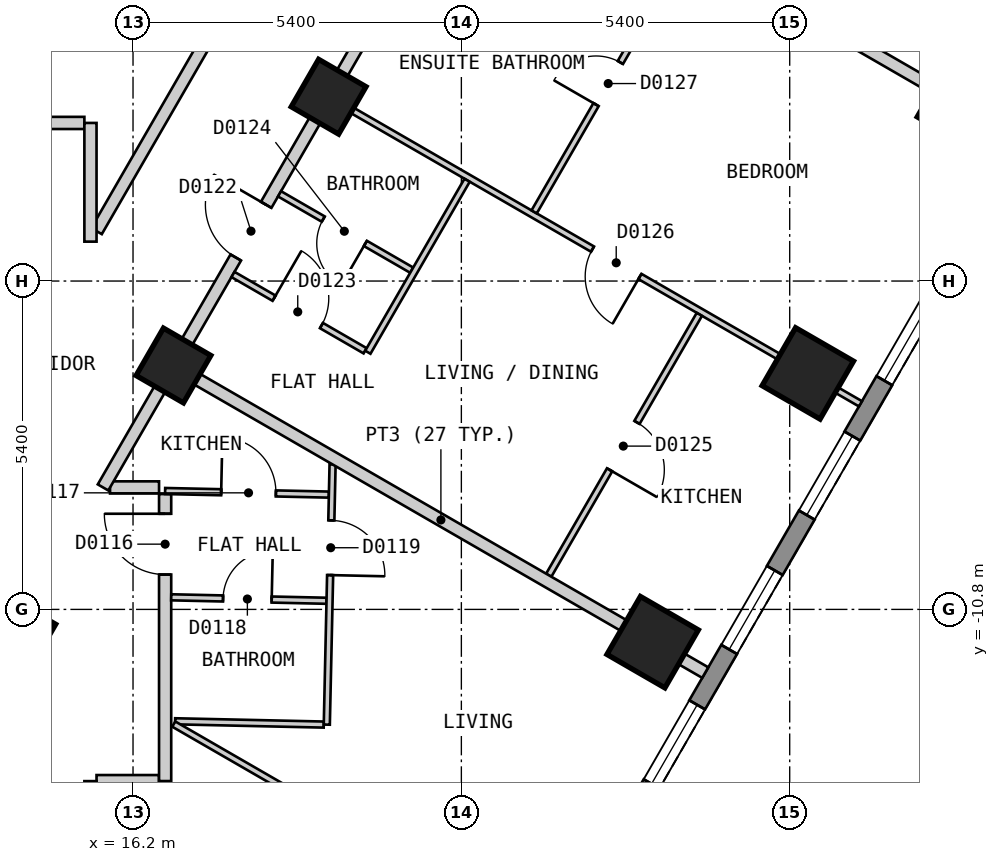
"""IFC4 building model, lengths in metres.
Left out: names, types, materials, properties, quantities, classifications, styles, units other than length and angle.
Written with IfcOpenShell. Run it as: python <this file> out.ifc"""

import sys

from ifc_helpers import new_model, si_unit, direction, frame, frame_2d, origin, origin_2d, place, context, subcontext, project, spatial, polyline, rectangle, outline, extrude, element, fill, save


model = new_model("IFC4")
c1 = context("Model", 3, precision=1e-05, world=origin(), true_north=direction((0.0, 1.0)))
c2 = subcontext(c1, "Body", "Model", "MODEL_VIEW")
j1 = project(units=[si_unit("LENGTHUNIT", "METRE"), si_unit("PLANEANGLEUNIT", "RADIAN")], contexts=[c1])
p1 = place(None, origin())
s1 = spatial("IfcSite", under=j1, at=p1, CompositionType="ELEMENT")
p2 = place(p1, origin())
s2 = spatial("IfcBuilding", under=s1, at=p2, CompositionType="ELEMENT")
p3 = place(p2, frame((0.0, 0.0, 23.4)))
s3 = spatial("IfcBuildingStorey", under=s2, at=p3, CompositionType="ELEMENT", Elevation=23.4)
for number, where, z_axis, x_axis in (
    (1, (24.746, -11.339, 0.0), (0.0, 0.0, 1.0), (0.5, 0.866, 0.0)),
    (2, (27.298, -6.919, 0.0), (0.0, 0.0, 1.0), (0.5, 0.866, 0.0)),
    (3, (29.849, -2.499, 0.0), (0.0, 0.0, 1.0), (0.5, 0.866, 0.0)),
):
    element("IfcColumn", number, at=place(p3, frame(where, z_axis=z_axis, x_axis=x_axis)), inside=s3, PredefinedType="COLUMN", context=c2, shape_type="SweptSolid", body=[
        extrude(rectangle(XDim=1.1, YDim=1.1, at=origin_2d()), origin(), (0.0, 0.0, 1.0), 3.0),
    ])
for number, where, z_axis, x_axis in (
    (4, (14.313, -11.209, 0.0), (0.0, 0.0, 1.0), (0.5, 0.866, 0.0)),
    (5, (16.865, -6.789, 0.0), (0.0, 0.0, 1.0), (0.5, 0.866, 0.0)),
    (6, (19.417, -2.369, 0.0), (0.0, 0.0, 1.0), (0.5, 0.866, 0.0)),
):
    element("IfcColumn", number, at=place(p3, frame(where, z_axis=z_axis, x_axis=x_axis)), inside=s3, PredefinedType="COLUMN", context=c2, shape_type="SweptSolid", body=[
        extrude(rectangle(XDim=0.9, YDim=0.9, at=origin_2d()), origin(), (0.0, 0.0, 1.0), 3.0),
    ])
p4 = place(p3, frame((17.71, -25.825, 0.0), z_axis=(0.0, 0.0, 1.0), x_axis=(0.500001938803, 0.866024284413, 0.0)))
e7 = element("IfcWall", 7, at=p4, inside=s3, PredefinedType="SOLIDWALL", context=c2, shape_type="SweptSolid", body=[
    extrude(outline(polyline([(0.0, -0.15), (27.02, -0.15), (26.94, 0.15), (0.08, 0.15), (0.0, -0.15)])), origin(), (0.0, 0.0, 1.0), 2.7),
])
p5 = place(p4, frame((1.277, 0.0, 0.15)))
e8 = element("IfcOpeningElement", 8, at=p5, cuts=e7, PredefinedType="OPENING", context=c2, shape_type="SweptSolid", body=[
    extrude(rectangle(XDim=1.5, YDim=2.1, at=frame_2d((0.75, 1.05))), frame((0.0, 0.16, 0.0), z_axis=(0.0, -1.0, 0.0), x_axis=(1.0, 0.0, 0.0)), (0.0, 0.0, 1.0), 0.32),
])
p6 = place(p4, frame((3.829, 0.0, 0.15)))
e9 = element("IfcOpeningElement", 9, at=p6, cuts=e7, PredefinedType="OPENING", context=c2, shape_type="SweptSolid", body=[
    extrude(rectangle(XDim=1.5, YDim=2.1, at=frame_2d((0.75, 1.05))), frame((0.0, 0.16, 0.0), z_axis=(0.0, -1.0, 0.0), x_axis=(1.0, 0.0, 0.0)), (0.0, 0.0, 1.0), 0.32),
])
p7 = place(p4, frame((6.382, 0.0, 0.15)))
e10 = element("IfcOpeningElement", 10, at=p7, cuts=e7, PredefinedType="OPENING", context=c2, shape_type="SweptSolid", body=[
    extrude(rectangle(XDim=1.5, YDim=2.1, at=frame_2d((0.75, 1.05))), frame((0.0, 0.16, 0.0), z_axis=(0.0, -1.0, 0.0), x_axis=(1.0, 0.0, 0.0)), (0.0, 0.0, 1.0), 0.32),
])
p8 = place(p4, frame((8.933, 0.0, 0.15)))
e11 = element("IfcOpeningElement", 11, at=p8, cuts=e7, PredefinedType="OPENING", context=c2, shape_type="SweptSolid", body=[
    extrude(rectangle(XDim=1.5, YDim=2.1, at=frame_2d((0.75, 1.05))), frame((0.0, 0.16, 0.0), z_axis=(0.0, -1.0, 0.0), x_axis=(1.0, 0.0, 0.0)), (0.0, 0.0, 1.0), 0.32),
])
p9 = place(p4, frame((11.485, 0.0, 0.15)))
e12 = element("IfcOpeningElement", 12, at=p9, cuts=e7, PredefinedType="OPENING", context=c2, shape_type="SweptSolid", body=[
    extrude(rectangle(XDim=1.5, YDim=2.1, at=frame_2d((0.75, 1.05))), frame((0.0, 0.16, 0.0), z_axis=(0.0, -1.0, 0.0), x_axis=(1.0, 0.0, 0.0)), (0.0, 0.0, 1.0), 0.32),
])
p10 = place(p4, frame((14.037, 0.0, 0.15)))
e13 = element("IfcOpeningElement", 13, at=p10, cuts=e7, PredefinedType="OPENING", context=c2, shape_type="SweptSolid", body=[
    extrude(rectangle(XDim=1.5, YDim=2.1, at=frame_2d((0.75, 1.05))), frame((0.0, 0.16, 0.0), z_axis=(0.0, -1.0, 0.0), x_axis=(1.0, 0.0, 0.0)), (0.0, 0.0, 1.0), 0.32),
])
p11 = place(p4, frame((16.589, 0.0, 0.15)))
e14 = element("IfcOpeningElement", 14, at=p11, cuts=e7, PredefinedType="OPENING", context=c2, shape_type="SweptSolid", body=[
    extrude(rectangle(XDim=1.5, YDim=2.1, at=frame_2d((0.75, 1.05))), frame((0.0, 0.16, 0.0), z_axis=(0.0, -1.0, 0.0), x_axis=(1.0, 0.0, 0.0)), (0.0, 0.0, 1.0), 0.32),
])
p12 = place(p4, frame((19.141, 0.0, 0.15)))
e15 = element("IfcOpeningElement", 15, at=p12, cuts=e7, PredefinedType="OPENING", context=c2, shape_type="SweptSolid", body=[
    extrude(rectangle(XDim=1.5, YDim=2.1, at=frame_2d((0.75, 1.05))), frame((0.0, 0.16, 0.0), z_axis=(0.0, -1.0, 0.0), x_axis=(1.0, 0.0, 0.0)), (0.0, 0.0, 1.0), 0.32),
])
p13 = place(p4, frame((21.693, 0.0, 0.15)))
e16 = element("IfcOpeningElement", 16, at=p13, cuts=e7, PredefinedType="OPENING", context=c2, shape_type="SweptSolid", body=[
    extrude(rectangle(XDim=1.5, YDim=2.1, at=frame_2d((0.75, 1.05))), frame((0.0, 0.16, 0.0), z_axis=(0.0, -1.0, 0.0), x_axis=(1.0, 0.0, 0.0)), (0.0, 0.0, 1.0), 0.32),
])
p14 = place(p4, frame((24.244, 0.0, 0.15)))
e17 = element("IfcOpeningElement", 17, at=p14, cuts=e7, PredefinedType="OPENING", context=c2, shape_type="SweptSolid", body=[
    extrude(rectangle(XDim=1.5, YDim=2.1, at=frame_2d((0.75, 1.05))), frame((0.0, 0.16, 0.0), z_axis=(0.0, -1.0, 0.0), x_axis=(1.0, 0.0, 0.0)), (0.0, 0.0, 1.0), 0.32),
])
p15 = place(p3, frame((15.822, -8.794, 0.0), z_axis=(0.0, 0.0, 1.0), x_axis=(1.0, 0.0, 0.0)))
e18 = element("IfcWall", 18, at=p15, inside=s3, PredefinedType="PARTITIONING", context=c2, shape_type="SweptSolid", body=[
    extrude(rectangle(XDim=0.806, YDim=0.2, at=frame_2d((0.403, 0.0))), origin(), (0.0, 0.0, 1.0), 2.7),
])
p16 = place(p3, frame((15.6, -13.624, 0.0), z_axis=(0.0, 0.0, 1.0), x_axis=(1.0, 0.0, 0.0)))
e19 = element("IfcWall", 19, at=p16, inside=s3, PredefinedType="PARTITIONING", context=c2, shape_type="SweptSolid", body=[
    extrude(rectangle(XDim=1.027, YDim=0.2, at=frame_2d((0.513, 0.0))), origin(), (0.0, 0.0, 1.0), 2.7),
])
p17 = place(p3, frame((7.028, -2.8, 0.0), z_axis=(0.0, 0.0, 1.0), x_axis=(1.0, 0.0, 0.0)))
e20 = element("IfcWall", 20, at=p17, inside=s3, PredefinedType="PARTITIONING", context=c2, shape_type="SweptSolid", body=[
    extrude(rectangle(XDim=8.372, YDim=0.2, at=frame_2d((4.186, 0.0))), origin(), (0.0, 0.0, 1.0), 2.7),
])
p18 = place(p3, frame((15.6, -4.579, 0.0), z_axis=(0.0, 0.0, 1.0), x_axis=(0.499927597274, 0.866067201483, 0.0)))
e21 = element("IfcWall", 21, at=p18, inside=s3, PredefinedType="PARTITIONING", context=c2, shape_type="SweptSolid", body=[
    extrude(rectangle(XDim=5.288, YDim=0.2, at=frame_2d((2.644, 0.0))), origin(), (0.0, 0.0, 1.0), 2.7),
])
p19 = place(p3, frame((15.707, -8.794, 0.0), z_axis=(0.0, 0.0, 1.0), x_axis=(0.500040469623, 0.866002037376, 0.0)))
e22 = element("IfcWall", 22, at=p19, inside=s3, PredefinedType="PARTITIONING", context=c2, shape_type="SweptSolid", body=[
    extrude(rectangle(XDim=2.281, YDim=0.2, at=frame_2d((1.141, 0.0))), origin(), (0.0, 0.0, 1.0), 2.7),
])
p20 = place(p3, frame((16.914, -6.703, 0.0), z_axis=(0.0, 0.0, 1.0), x_axis=(0.50003007663, 0.866008038338, 0.0)))
e23 = element("IfcWall", 23, at=p20, inside=s3, PredefinedType="PARTITIONING", context=c2, shape_type="SweptSolid", body=[
    extrude(rectangle(XDim=7.625, YDim=0.2, at=frame_2d((3.813, 0.0))), origin(), (0.0, 0.0, 1.0), 2.7),
])
p21 = place(p20, frame((1.952, 0.0, 0.0)))
e24 = element("IfcOpeningElement", 24, at=p21, cuts=e23, PredefinedType="OPENING", context=c2, shape_type="SweptSolid", body=[
    extrude(rectangle(XDim=1.0, YDim=2.1, at=frame_2d((0.5, 1.05))), frame((0.0, 0.11, 0.0), z_axis=(0.0, -1.0, 0.0), x_axis=(1.0, 0.0, 0.0)), (0.0, 0.0, 1.0), 0.22),
])
p22 = place(p3, frame((15.5, -21.199, 0.0), z_axis=(0.0, 0.0, 1.0), x_axis=(0.0, 1.0, 0.0)))
e25 = element("IfcWall", 25, at=p22, inside=s3, PredefinedType="PARTITIONING", context=c2, shape_type="SweptSolid", body=[
    extrude(rectangle(XDim=7.575, YDim=0.2, at=frame_2d((3.788, 0.0))), origin(), (0.0, 0.0, 1.0), 2.7),
])
p23 = place(p22, frame((1.288, 0.0, 0.0)))
e26 = element("IfcOpeningElement", 26, at=p23, cuts=e25, PredefinedType="OPENING", context=c2, shape_type="SweptSolid", body=[
    extrude(rectangle(XDim=0.8, YDim=2.1, at=frame_2d((0.4, 1.05))), frame((0.0, 0.11, 0.0), z_axis=(0.0, -1.0, 0.0), x_axis=(1.0, 0.0, 0.0)), (0.0, 0.0, 1.0), 0.22),
])
p24 = place(p3, frame((15.5, -4.752, 0.0), z_axis=(0.0, 0.0, 1.0), x_axis=(0.0, 1.0, 0.0)))
e27 = element("IfcWall", 27, at=p24, inside=s3, PredefinedType="PARTITIONING", context=c2, shape_type="SweptSolid", body=[
    extrude(rectangle(XDim=1.952, YDim=0.2, at=frame_2d((0.976, 0.0))), origin(), (0.0, 0.0, 1.0), 2.7),
])
p25 = place(p3, frame((16.728, -13.623, 0.0), z_axis=(0.0, 0.0, 1.0), x_axis=(0.0, 1.0, 0.0)))
e28 = element("IfcWall", 28, at=p25, inside=s3, PredefinedType="PARTITIONING", context=c2, shape_type="SweptSolid", body=[
    extrude(rectangle(XDim=4.72, YDim=0.2, at=frame_2d((2.36, 0.0))), origin(), (0.0, 0.0, 1.0), 2.7),
])
p26 = place(p25, frame((3.396, 0.0, 0.0)))
e29 = element("IfcOpeningElement", 29, at=p26, cuts=e28, PredefinedType="OPENING", context=c2, shape_type="SweptSolid", body=[
    extrude(rectangle(XDim=1.0, YDim=2.1, at=frame_2d((0.5, 1.05))), frame((0.0, 0.11, 0.0), z_axis=(0.0, -1.0, 0.0), x_axis=(1.0, 0.0, 0.0)), (0.0, 0.0, 1.0), 0.22),
])
p27 = place(p3, frame((16.728, -8.853, 0.0), z_axis=(0.0, 0.0, 1.0), x_axis=(0.999759401479, -0.02193488442, 0.0)))
e30 = element("IfcWall", 30, at=p27, inside=s3, PredefinedType="PARTITIONING", context=c2, shape_type="SweptSolid", body=[
    extrude(rectangle(XDim=2.694, YDim=0.1, at=frame_2d((1.347, 0.0))), origin(), (0.0, 0.0, 1.0), 2.7),
])
p28 = place(p27, frame((0.922, 0.0, 0.0)))
e31 = element("IfcOpeningElement", 31, at=p28, cuts=e30, PredefinedType="OPENING", context=c2, shape_type="SweptSolid", body=[
    extrude(rectangle(XDim=0.9, YDim=2.1, at=frame_2d((0.45, 1.05))), frame((0.0, 0.06, 0.0), z_axis=(0.0, -1.0, 0.0), x_axis=(1.0, 0.0, 0.0)), (0.0, 0.0, 1.0), 0.12),
])
p29 = place(p3, frame((16.828, -10.601, 0.0), z_axis=(0.0, 0.0, 1.0), x_axis=(0.999752091799, -0.022265555094, 0.0)))
e32 = element("IfcWall", 32, at=p29, inside=s3, PredefinedType="PARTITIONING", context=c2, shape_type="SweptSolid", body=[
    extrude(rectangle(XDim=2.555, YDim=0.1, at=frame_2d((1.277, 0.0))), origin(), (0.0, 0.0, 1.0), 2.7),
])
p30 = place(p29, frame((0.853, 0.0, 0.0)))
e33 = element("IfcOpeningElement", 33, at=p30, cuts=e32, PredefinedType="OPENING", context=c2, shape_type="SweptSolid", body=[
    extrude(rectangle(XDim=0.8, YDim=2.1, at=frame_2d((0.4, 1.05))), frame((0.0, 0.06, 0.0), z_axis=(0.0, -1.0, 0.0), x_axis=(1.0, 0.0, 0.0)), (0.0, 0.0, 1.0), 0.12),
])
p31 = place(p3, frame((16.892, -12.64, 0.0), z_axis=(0.0, 0.0, 1.0), x_axis=(0.999754359069, -0.022163517846, 0.0)))
e34 = element("IfcWall", 34, at=p31, inside=s3, PredefinedType="PARTITIONING", context=c2, shape_type="SweptSolid", body=[
    extrude(rectangle(XDim=2.445, YDim=0.1, at=frame_2d((1.223, 0.0))), origin(), (0.0, 0.0, 1.0), 2.7),
])
p32 = place(p3, frame((16.87, -12.686, 0.0), z_axis=(0.0, 0.0, 1.0), x_axis=(0.866071826058, -0.499919585642, 0.0)))
e35 = element("IfcWall", 35, at=p32, inside=s3, PredefinedType="PARTITIONING", context=c2, shape_type="SweptSolid", body=[
    extrude(rectangle(XDim=7.147, YDim=0.1, at=frame_2d((3.574, 0.0))), origin(), (0.0, 0.0, 1.0), 2.7),
])
p33 = place(p32, frame((4.558, 0.0, 0.0)))
e36 = element("IfcOpeningElement", 36, at=p33, cuts=e35, PredefinedType="OPENING", context=c2, shape_type="SweptSolid", body=[
    extrude(rectangle(XDim=0.9, YDim=2.1, at=frame_2d((0.45, 1.05))), frame((0.0, 0.06, 0.0), z_axis=(0.0, -1.0, 0.0), x_axis=(1.0, 0.0, 0.0)), (0.0, 0.0, 1.0), 0.12),
])
p34 = place(p3, frame((17.844, -5.292, 0.0), z_axis=(0.0, 0.0, 1.0), x_axis=(0.865940918122, -0.500146304917, 0.0)))
e37 = element("IfcWall", 37, at=p34, inside=s3, PredefinedType="PARTITIONING", context=c2, shape_type="SweptSolid", body=[
    extrude(rectangle(XDim=2.51, YDim=0.1, at=frame_2d((1.255, 0.0))), origin(), (0.0, 0.0, 1.0), 2.7),
])
p35 = place(p34, frame((0.78, 0.0, 0.0)))
e38 = element("IfcOpeningElement", 38, at=p35, cuts=e37, PredefinedType="OPENING", context=c2, shape_type="SweptSolid", body=[
    extrude(rectangle(XDim=0.9, YDim=2.1, at=frame_2d((0.45, 1.05))), frame((0.0, 0.06, 0.0), z_axis=(0.0, -1.0, 0.0), x_axis=(1.0, 0.0, 0.0)), (0.0, 0.0, 1.0), 0.12),
])
p36 = place(p3, frame((18.61, -3.966, 0.0), z_axis=(0.0, 0.0, 1.0), x_axis=(0.865958718457, -0.500115484592, 0.0)))
e39 = element("IfcWall", 39, at=p36, inside=s3, PredefinedType="PARTITIONING", context=c2, shape_type="SweptSolid", body=[
    extrude(rectangle(XDim=2.509, YDim=0.1, at=frame_2d((1.255, 0.0))), origin(), (0.0, 0.0, 1.0), 2.7),
])
p37 = place(p36, frame((0.83, 0.0, 0.0)))
e40 = element("IfcOpeningElement", 40, at=p37, cuts=e39, PredefinedType="OPENING", context=c2, shape_type="SweptSolid", body=[
    extrude(rectangle(XDim=0.8, YDim=2.1, at=frame_2d((0.4, 1.05))), frame((0.0, 0.06, 0.0), z_axis=(0.0, -1.0, 0.0), x_axis=(1.0, 0.0, 0.0)), (0.0, 0.0, 1.0), 0.12),
])
p38 = place(p3, frame((19.503, -2.419, 0.0), z_axis=(0.0, 0.0, 1.0), x_axis=(0.866047370643, -0.499961950354, 0.0)))
e41 = element("IfcWall", 41, at=p38, inside=s3, PredefinedType="PARTITIONING", context=c2, shape_type="SweptSolid", body=[
    extrude(rectangle(XDim=10.001, YDim=0.1, at=frame_2d((5.0, 0.0))), origin(), (0.0, 0.0, 1.0), 2.7),
])
p39 = place(p38, frame((4.912, 0.0, 0.0)))
e42 = element("IfcOpeningElement", 42, at=p39, cuts=e41, PredefinedType="OPENING", context=c2, shape_type="SweptSolid", body=[
    extrude(rectangle(XDim=0.9, YDim=2.1, at=frame_2d((0.45, 1.05))), frame((0.0, 0.06, 0.0), z_axis=(0.0, -1.0, 0.0), x_axis=(1.0, 0.0, 0.0)), (0.0, 0.0, 1.0), 0.12),
])
p40 = place(p3, frame((20.062, -6.571, 0.0), z_axis=(0.0, 0.0, 1.0), x_axis=(0.49983032932, 0.866123341039, 0.0)))
e43 = element("IfcWall", 43, at=p40, inside=s3, PredefinedType="PARTITIONING", context=c2, shape_type="SweptSolid", body=[
    extrude(rectangle(XDim=3.265, YDim=0.1, at=frame_2d((1.633, 0.0))), origin(), (0.0, 0.0, 1.0), 2.7),
])
p41 = place(p3, frame((22.797, -4.263, 0.0), z_axis=(0.0, 0.0, 1.0), x_axis=(0.499820637322, 0.866128934112, 0.0)))
e44 = element("IfcWall", 44, at=p41, inside=s3, PredefinedType="PARTITIONING", context=c2, shape_type="SweptSolid", body=[
    extrude(rectangle(XDim=4.807, YDim=0.1, at=frame_2d((2.404, 0.0))), origin(), (0.0, 0.0, 1.0), 2.7),
])
p42 = place(p41, frame((2.037, 0.0, 0.0)))
e45 = element("IfcOpeningElement", 45, at=p42, cuts=e44, PredefinedType="OPENING", context=c2, shape_type="SweptSolid", body=[
    extrude(rectangle(XDim=0.8, YDim=2.1, at=frame_2d((0.4, 1.05))), frame((0.0, 0.06, 0.0), z_axis=(0.0, -1.0, 0.0), x_axis=(1.0, 0.0, 0.0)), (0.0, 0.0, 1.0), 0.12),
])
p43 = place(p3, frame((23.037, -10.238, 0.0), z_axis=(0.0, 0.0, 1.0), x_axis=(0.49999264683, 0.866029649098, 0.0)))
e46 = element("IfcWall", 46, at=p43, inside=s3, PredefinedType="PARTITIONING", context=c2, shape_type="SweptSolid", body=[
    extrude(rectangle(XDim=4.954, YDim=0.1, at=frame_2d((2.477, 0.0))), origin(), (0.0, 0.0, 1.0), 2.7),
])
p44 = place(p43, frame((2.002, 0.0, 0.0)))
e47 = element("IfcOpeningElement", 47, at=p44, cuts=e46, PredefinedType="OPENING", context=c2, shape_type="SweptSolid", body=[
    extrude(rectangle(XDim=0.9, YDim=2.1, at=frame_2d((0.45, 1.05))), frame((0.0, 0.06, 0.0), z_axis=(0.0, -1.0, 0.0), x_axis=(1.0, 0.0, 0.0)), (0.0, 0.0, 1.0), 0.12),
])
p45 = place(p3, frame((19.387, -12.695, 0.0), z_axis=(0.0, 0.0, 1.0), x_axis=(0.022188864436, 0.99975379684, 0.0)))
e48 = element("IfcWall", 48, at=p45, inside=s3, PredefinedType="PARTITIONING", context=c2, shape_type="SweptSolid", body=[
    extrude(rectangle(XDim=4.28, YDim=0.1, at=frame_2d((2.14, 0.0))), origin(), (0.0, 0.0, 1.0), 2.7),
])
p46 = place(p45, frame((2.46, 0.0, 0.0)))
e49 = element("IfcOpeningElement", 49, at=p46, cuts=e48, PredefinedType="OPENING", context=c2, shape_type="SweptSolid", body=[
    extrude(rectangle(XDim=0.9, YDim=2.1, at=frame_2d((0.45, 1.05))), frame((0.0, 0.06, 0.0), z_axis=(0.0, -1.0, 0.0), x_axis=(1.0, 0.0, 0.0)), (0.0, 0.0, 1.0), 0.12),
])
p47 = place(p3, frame((25.693, -0.099, 0.0), z_axis=(0.0, 0.0, 1.0), x_axis=(0.866032775405, -0.499987231761, 0.0)))
e50 = element("IfcWall", 50, at=p47, inside=s3, PredefinedType="PARTITIONING", context=c2, shape_type="SweptSolid", body=[
    extrude(rectangle(XDim=5.8, YDim=0.2, at=frame_2d((2.9, 0.0))), origin(), (0.0, 0.0, 1.0), 2.7),
])
p48 = place(p3, frame((16.916, -6.819, 0.0), z_axis=(0.0, 0.0, 1.0), x_axis=(0.866028876723, -0.499993984646, 0.0)))
e51 = element("IfcWall", 51, at=p48, inside=s3, PredefinedType="PARTITIONING", context=c2, shape_type="SweptSolid", body=[
    extrude(rectangle(XDim=10.04, YDim=0.2, at=frame_2d((5.02, 0.0))), origin(), (0.0, 0.0, 1.0), 2.7),
])
p49 = place(p10, origin())
e52 = element("IfcWindow", 52, at=p49, inside=s3, PartitioningType="SINGLE_PANEL", PredefinedType="WINDOW", context=c2, shape_type="SweptSolid", body=[
    extrude(rectangle(XDim=1.5, YDim=2.1, at=frame_2d((0.75, 1.05))), frame((0.0, 0.03, 0.0), z_axis=(0.0, -1.0, 0.0), x_axis=(1.0, 0.0, 0.0)), (0.0, 0.0, 1.0), 0.06),
])
fill(e13, e52)
p50 = place(p11, origin())
e53 = element("IfcWindow", 53, at=p50, inside=s3, PartitioningType="SINGLE_PANEL", PredefinedType="WINDOW", context=c2, shape_type="SweptSolid", body=[
    extrude(rectangle(XDim=1.5, YDim=2.1, at=frame_2d((0.75, 1.05))), frame((0.0, 0.03, 0.0), z_axis=(0.0, -1.0, 0.0), x_axis=(1.0, 0.0, 0.0)), (0.0, 0.0, 1.0), 0.06),
])
fill(e14, e53)
p51 = place(p12, origin())
e54 = element("IfcWindow", 54, at=p51, inside=s3, PartitioningType="SINGLE_PANEL", PredefinedType="WINDOW", context=c2, shape_type="SweptSolid", body=[
    extrude(rectangle(XDim=1.5, YDim=2.1, at=frame_2d((0.75, 1.05))), frame((0.0, 0.03, 0.0), z_axis=(0.0, -1.0, 0.0), x_axis=(1.0, 0.0, 0.0)), (0.0, 0.0, 1.0), 0.06),
])
fill(e15, e54)
p52 = place(p13, origin())
e55 = element("IfcWindow", 55, at=p52, inside=s3, PartitioningType="SINGLE_PANEL", PredefinedType="WINDOW", context=c2, shape_type="SweptSolid", body=[
    extrude(rectangle(XDim=1.5, YDim=2.1, at=frame_2d((0.75, 1.05))), frame((0.0, 0.03, 0.0), z_axis=(0.0, -1.0, 0.0), x_axis=(1.0, 0.0, 0.0)), (0.0, 0.0, 1.0), 0.06),
])
fill(e16, e55)
p53 = place(p26, origin())
e56 = element("IfcDoor", 56, at=p53, inside=s3, OperationType="SINGLE_SWING_RIGHT", PredefinedType="DOOR", context=c2, shape_type="SweptSolid", body=[
    extrude(rectangle(XDim=1.0, YDim=2.1, at=frame_2d((0.5, 1.05))), frame((0.0, 0.025, 0.0), z_axis=(0.0, -1.0, 0.0), x_axis=(1.0, 0.0, 0.0)), (0.0, 0.0, 1.0), 0.05),
])
fill(e29, e56)
p54 = place(p28, origin())
e57 = element("IfcDoor", 57, at=p54, inside=s3, OperationType="SINGLE_SWING_LEFT", PredefinedType="DOOR", context=c2, shape_type="SweptSolid", body=[
    extrude(rectangle(XDim=0.9, YDim=2.1, at=frame_2d((0.45, 1.05))), frame((0.0, 0.025, 0.0), z_axis=(0.0, -1.0, 0.0), x_axis=(1.0, 0.0, 0.0)), (0.0, 0.0, 1.0), 0.05),
])
fill(e31, e57)
p55 = place(p30, origin())
e58 = element("IfcDoor", 58, at=p55, inside=s3, OperationType="SINGLE_SWING_RIGHT", PredefinedType="DOOR", context=c2, shape_type="SweptSolid", body=[
    extrude(rectangle(XDim=0.8, YDim=2.1, at=frame_2d((0.4, 1.05))), frame((0.0, 0.025, 0.0), z_axis=(0.0, -1.0, 0.0), x_axis=(1.0, 0.0, 0.0)), (0.0, 0.0, 1.0), 0.05),
])
fill(e33, e58)
p56 = place(p46, origin())
e59 = element("IfcDoor", 59, at=p56, inside=s3, OperationType="SINGLE_SWING_LEFT", PredefinedType="DOOR", context=c2, shape_type="SweptSolid", body=[
    extrude(rectangle(XDim=0.9, YDim=2.1, at=frame_2d((0.45, 1.05))), frame((0.0, 0.025, 0.0), z_axis=(0.0, -1.0, 0.0), x_axis=(1.0, 0.0, 0.0)), (0.0, 0.0, 1.0), 0.05),
])
fill(e49, e59)
p57 = place(p21, origin())
e60 = element("IfcDoor", 60, at=p57, inside=s3, OperationType="SINGLE_SWING_RIGHT", PredefinedType="DOOR", context=c2, shape_type="SweptSolid", body=[
    extrude(rectangle(XDim=1.0, YDim=2.1, at=frame_2d((0.5, 1.05))), frame((0.0, 0.025, 0.0), z_axis=(0.0, -1.0, 0.0), x_axis=(1.0, 0.0, 0.0)), (0.0, 0.0, 1.0), 0.05),
])
fill(e24, e60)
p58 = place(p35, origin())
e61 = element("IfcDoor", 61, at=p58, inside=s3, OperationType="SINGLE_SWING_LEFT", PredefinedType="DOOR", context=c2, shape_type="SweptSolid", body=[
    extrude(rectangle(XDim=0.9, YDim=2.1, at=frame_2d((0.45, 1.05))), frame((0.0, 0.025, 0.0), z_axis=(0.0, -1.0, 0.0), x_axis=(1.0, 0.0, 0.0)), (0.0, 0.0, 1.0), 0.05),
])
fill(e38, e61)
p59 = place(p37, origin())
e62 = element("IfcDoor", 62, at=p59, inside=s3, OperationType="SINGLE_SWING_RIGHT", PredefinedType="DOOR", context=c2, shape_type="SweptSolid", body=[
    extrude(rectangle(XDim=0.8, YDim=2.1, at=frame_2d((0.4, 1.05))), frame((0.0, 0.025, 0.0), z_axis=(0.0, -1.0, 0.0), x_axis=(1.0, 0.0, 0.0)), (0.0, 0.0, 1.0), 0.05),
])
fill(e40, e62)
p60 = place(p44, origin())
e63 = element("IfcDoor", 63, at=p60, inside=s3, OperationType="SINGLE_SWING_LEFT", PredefinedType="DOOR", context=c2, shape_type="SweptSolid", body=[
    extrude(rectangle(XDim=0.9, YDim=2.1, at=frame_2d((0.45, 1.05))), frame((0.0, 0.025, 0.0), z_axis=(0.0, -1.0, 0.0), x_axis=(1.0, 0.0, 0.0)), (0.0, 0.0, 1.0), 0.05),
])
fill(e47, e63)
p61 = place(p39, origin())
e64 = element("IfcDoor", 64, at=p61, inside=s3, OperationType="SINGLE_SWING_RIGHT", PredefinedType="DOOR", context=c2, shape_type="SweptSolid", body=[
    extrude(rectangle(XDim=0.9, YDim=2.1, at=frame_2d((0.45, 1.05))), frame((0.0, 0.025, 0.0), z_axis=(0.0, -1.0, 0.0), x_axis=(1.0, 0.0, 0.0)), (0.0, 0.0, 1.0), 0.05),
])
fill(e42, e64)
p62 = place(p42, origin())
e65 = element("IfcDoor", 65, at=p62, inside=s3, OperationType="SINGLE_SWING_LEFT", PredefinedType="DOOR", context=c2, shape_type="SweptSolid", body=[
    extrude(rectangle(XDim=0.8, YDim=2.1, at=frame_2d((0.4, 1.05))), frame((0.0, 0.025, 0.0), z_axis=(0.0, -1.0, 0.0), x_axis=(1.0, 0.0, 0.0)), (0.0, 0.0, 1.0), 0.05),
])
fill(e45, e65)
save(model, sys.argv[1])
